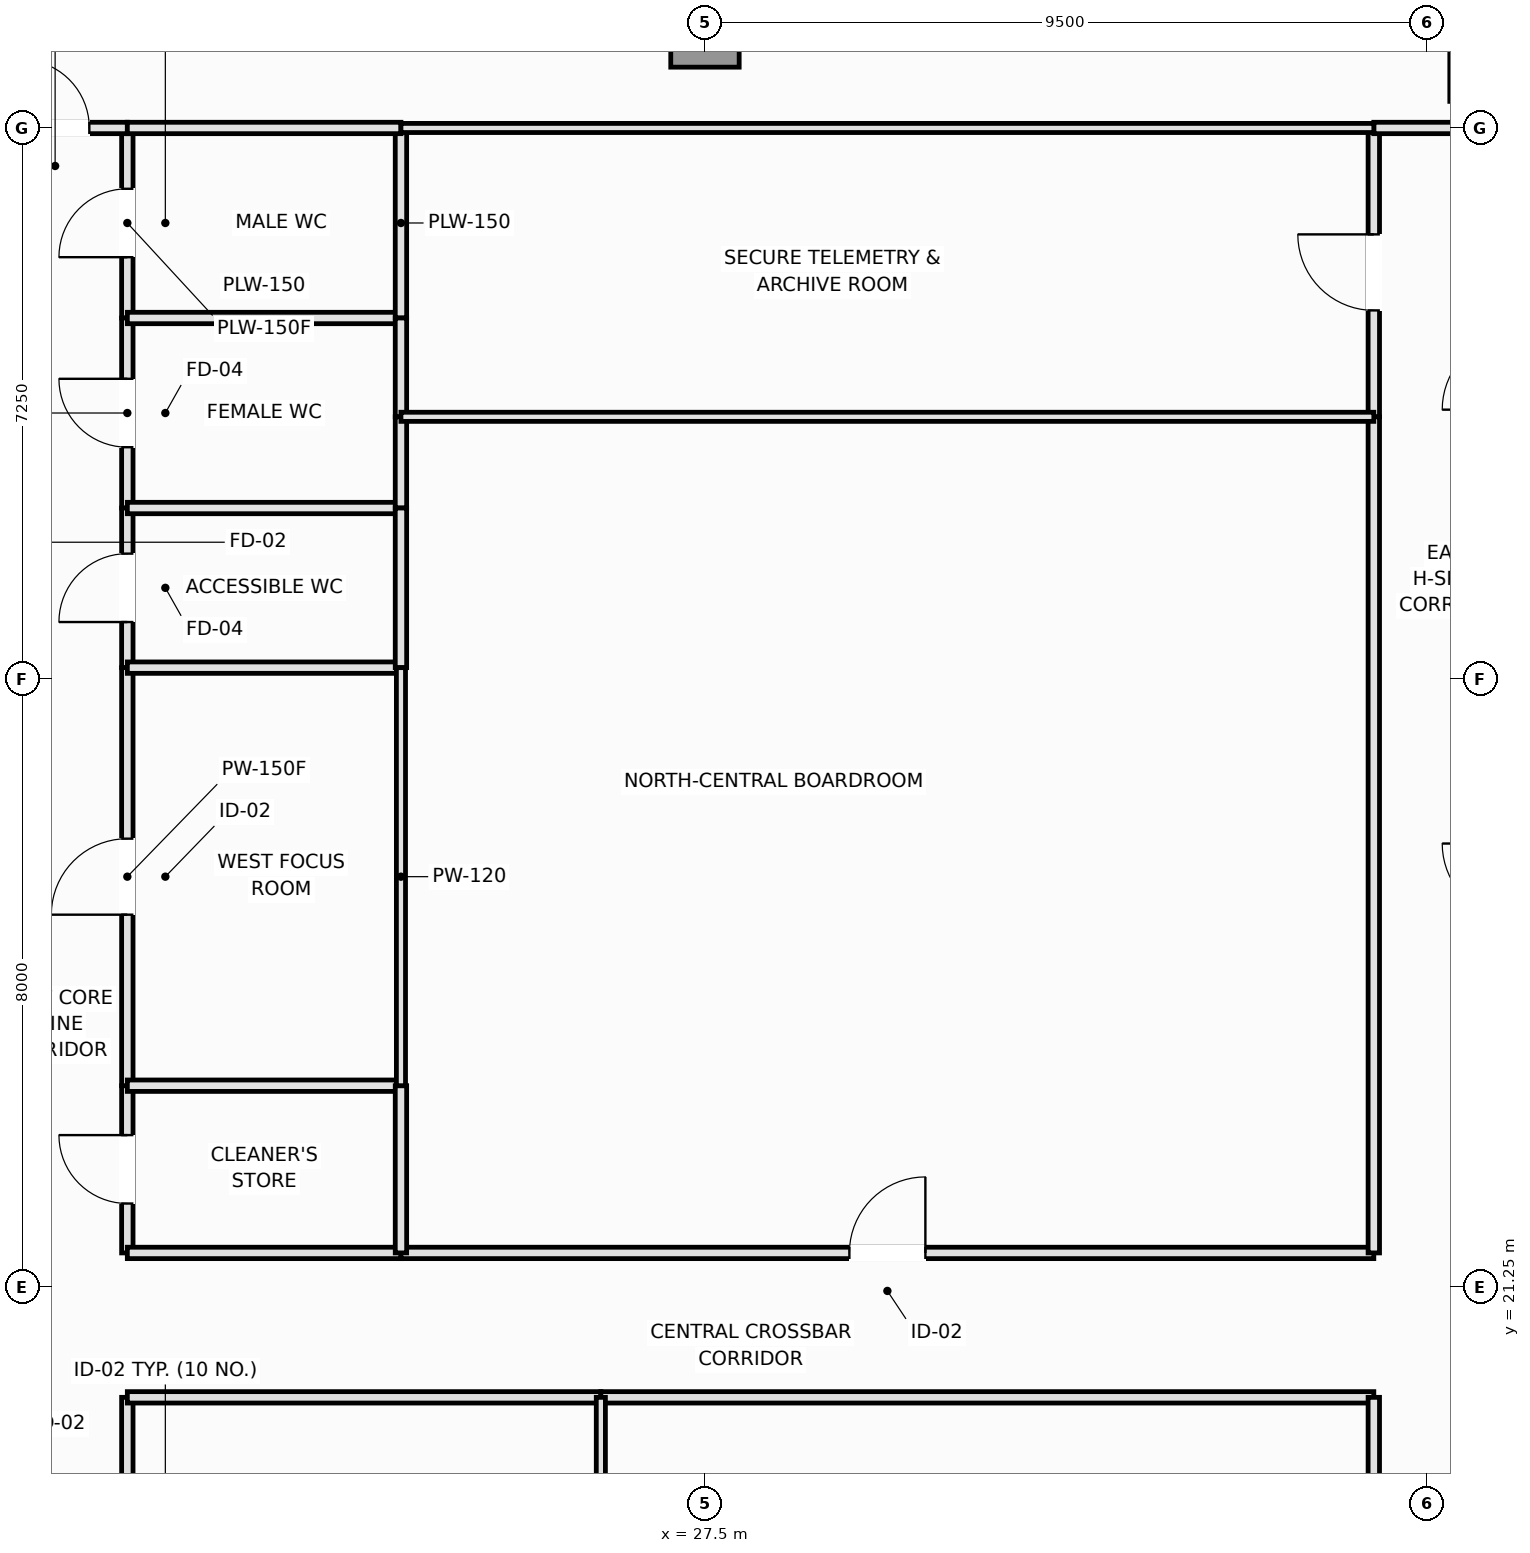
"""IFC4 building model, lengths in metres.
Left out: names, types, materials, properties, quantities, classifications, styles, units other than length and angle.
Written with IfcOpenShell. Run it as: python <this file> out.ifc"""

import sys

from ifc_helpers import new_model, si_unit, direction, frame, frame_2d, origin, origin_2d, place, context, subcontext, project, spatial, rectangle, extrude, element, fill, save


model = new_model("IFC4")
c1 = context("Model", 3, precision=1e-05, world=origin(), true_north=direction((0.0, 1.0)))
c2 = subcontext(c1, "Body", "Model", "MODEL_VIEW")
j1 = project(units=[si_unit("LENGTHUNIT", "METRE"), si_unit("PLANEANGLEUNIT", "RADIAN")], contexts=[c1])
p1 = place(None, origin())
s1 = spatial("IfcSite", under=j1, at=p1, CompositionType="ELEMENT")
p2 = place(p1, origin())
s2 = spatial("IfcBuilding", under=s1, at=p2, CompositionType="ELEMENT")
p3 = place(p2, frame((0.0, 0.0, 223.55)))
s3 = spatial("IfcBuildingStorey", under=s2, at=p3, CompositionType="ELEMENT", Elevation=223.55)
p4 = place(p3, frame((38.2, 37.75, 0.0), z_axis=(0.0, 0.0, 1.0), x_axis=(1.0, 0.0, 0.0)))
e1 = element("IfcColumn", 1, at=p4, inside=s3, PredefinedType="COLUMN", context=c2, shape_type="SweptSolid", body=[
    extrude(rectangle(XDim=1.8, YDim=1.8, at=origin_2d()), origin(), (0.0, 0.0, 1.0), 3.55),
])
p5 = place(p3, frame((27.5, 37.75, 0.0), z_axis=(0.0, 0.0, 1.0), x_axis=(1.0, 0.0, 0.0)))
e2 = element("IfcColumn", 2, at=p5, inside=s3, PredefinedType="COLUMN", context=c2, shape_type="SweptSolid", body=[
    extrude(rectangle(XDim=0.9, YDim=0.9, at=origin_2d()), origin(), (0.0, 0.0, 1.0), 3.55),
])
p6 = place(p3, frame((19.9, 15.9, 0.0), z_axis=(0.0, 0.0, 1.0), x_axis=(0.0, 1.0, 0.0)))
e3 = element("IfcWall", 3, at=p6, inside=s3, PredefinedType="PARTITIONING", context=c2, shape_type="SweptSolid", body=[
    extrude(rectangle(XDim=3.9, YDim=0.15, at=frame_2d((1.95, 0.0))), origin(), (0.0, 0.0, 1.0), 3.37),
])
p7 = place(p6, frame((1.45, 0.0, 0.0)))
e4 = element("IfcOpeningElement", 4, at=p7, cuts=e3, PredefinedType="OPENING", context=c2, shape_type="SweptSolid", body=[
    extrude(rectangle(XDim=1.0, YDim=2.15, at=frame_2d((0.5, 1.075))), frame((0.0, 0.085, 0.0), z_axis=(0.0, -1.0, 0.0), x_axis=(1.0, 0.0, 0.0)), (0.0, 0.0, 1.0), 0.17),
])
p8 = place(p3, frame((19.9, 34.0, 0.0), z_axis=(0.0, 0.0, 1.0), x_axis=(0.0, 1.0, 0.0)))
e5 = element("IfcWall", 5, at=p8, inside=s3, PredefinedType="PLUMBINGWALL", context=c2, shape_type="SweptSolid", body=[
    extrude(rectangle(XDim=2.5, YDim=0.15, at=frame_2d((1.25, 0.0))), origin(), (0.0, 0.0, 1.0), 3.37),
])
p9 = place(p8, frame((0.8, 0.0, 0.0)))
e6 = element("IfcOpeningElement", 6, at=p9, cuts=e5, PredefinedType="OPENING", context=c2, shape_type="SweptSolid", body=[
    extrude(rectangle(XDim=0.9, YDim=2.1, at=frame_2d((0.45, 1.05))), frame((0.0, 0.085, 0.0), z_axis=(0.0, -1.0, 0.0), x_axis=(1.0, 0.0, 0.0)), (0.0, 0.0, 1.0), 0.17),
])
p10 = place(p3, frame((19.9, 31.5, 0.0), z_axis=(0.0, 0.0, 1.0), x_axis=(0.0, 1.0, 0.0)))
e7 = element("IfcWall", 7, at=p10, inside=s3, PredefinedType="PLUMBINGWALL", context=c2, shape_type="SweptSolid", body=[
    extrude(rectangle(XDim=2.5, YDim=0.15, at=frame_2d((1.25, 0.0))), origin(), (0.0, 0.0, 1.0), 3.37),
])
p11 = place(p10, frame((0.8, 0.0, 0.0)))
e8 = element("IfcOpeningElement", 8, at=p11, cuts=e7, PredefinedType="OPENING", context=c2, shape_type="SweptSolid", body=[
    extrude(rectangle(XDim=0.9, YDim=2.1, at=frame_2d((0.45, 1.05))), frame((0.0, 0.085, 0.0), z_axis=(0.0, -1.0, 0.0), x_axis=(1.0, 0.0, 0.0)), (0.0, 0.0, 1.0), 0.17),
])
p12 = place(p3, frame((19.9, 29.4, 0.0), z_axis=(0.0, 0.0, 1.0), x_axis=(0.0, 1.0, 0.0)))
e9 = element("IfcWall", 9, at=p12, inside=s3, PredefinedType="PLUMBINGWALL", context=c2, shape_type="SweptSolid", body=[
    extrude(rectangle(XDim=2.1, YDim=0.15, at=frame_2d((1.05, 0.0))), origin(), (0.0, 0.0, 1.0), 3.37),
])
p13 = place(p12, frame((0.6, 0.0, 0.0)))
e10 = element("IfcOpeningElement", 10, at=p13, cuts=e9, PredefinedType="OPENING", context=c2, shape_type="SweptSolid", body=[
    extrude(rectangle(XDim=0.9, YDim=2.1, at=frame_2d((0.45, 1.05))), frame((0.0, 0.085, 0.0), z_axis=(0.0, -1.0, 0.0), x_axis=(1.0, 0.0, 0.0)), (0.0, 0.0, 1.0), 0.17),
])
p14 = place(p3, frame((19.9, 21.7, 0.0), z_axis=(0.0, 0.0, 1.0), x_axis=(0.0, 1.0, 0.0)))
e11 = element("IfcWall", 11, at=p14, inside=s3, PredefinedType="PLUMBINGWALL", context=c2, shape_type="SweptSolid", body=[
    extrude(rectangle(XDim=2.2, YDim=0.15, at=frame_2d((1.1, 0.0))), origin(), (0.0, 0.0, 1.0), 3.37),
])
p15 = place(p14, frame((0.65, 0.0, 0.0)))
e12 = element("IfcOpeningElement", 12, at=p15, cuts=e11, PredefinedType="OPENING", context=c2, shape_type="SweptSolid", body=[
    extrude(rectangle(XDim=0.9, YDim=2.1, at=frame_2d((0.45, 1.05))), frame((0.0, 0.085, 0.0), z_axis=(0.0, -1.0, 0.0), x_axis=(1.0, 0.0, 0.0)), (0.0, 0.0, 1.0), 0.17),
])
p16 = place(p3, frame((19.9, 23.9, 0.0), z_axis=(0.0, 0.0, 1.0), x_axis=(0.0, 1.0, 0.0)))
e13 = element("IfcWall", 13, at=p16, inside=s3, PredefinedType="PARTITIONING", context=c2, shape_type="SweptSolid", body=[
    extrude(rectangle(XDim=5.5, YDim=0.15, at=frame_2d((2.75, 0.0))), origin(), (0.0, 0.0, 1.0), 3.37),
])
p17 = place(p16, frame((2.25, 0.0, 0.0)))
e14 = element("IfcOpeningElement", 14, at=p17, cuts=e13, PredefinedType="OPENING", context=c2, shape_type="SweptSolid", body=[
    extrude(rectangle(XDim=1.0, YDim=2.15, at=frame_2d((0.5, 1.075))), frame((0.0, 0.085, 0.0), z_axis=(0.0, -1.0, 0.0), x_axis=(1.0, 0.0, 0.0)), (0.0, 0.0, 1.0), 0.17),
])
p18 = place(p3, frame((18.0, 36.5, 0.0), z_axis=(0.0, 0.0, 1.0), x_axis=(1.0, 0.0, 0.0)))
e15 = element("IfcWall", 15, at=p18, inside=s3, PredefinedType="PARTITIONING", context=c2, shape_type="SweptSolid", body=[
    extrude(rectangle(XDim=1.9, YDim=0.15, at=frame_2d((0.95, 0.0))), origin(), (0.0, 0.0, 1.0), 3.37),
])
p19 = place(p18, frame((0.5, 0.0, 0.0)))
e16 = element("IfcOpeningElement", 16, at=p19, cuts=e15, PredefinedType="OPENING", context=c2, shape_type="SweptSolid", body=[
    extrude(rectangle(XDim=0.9, YDim=2.1, at=frame_2d((0.45, 1.05))), frame((0.0, 0.085, 0.0), z_axis=(0.0, -1.0, 0.0), x_axis=(1.0, 0.0, 0.0)), (0.0, 0.0, 1.0), 0.17),
])
p20 = place(p3, frame((19.9, 19.8, 0.0), z_axis=(0.0, 0.0, 1.0), x_axis=(1.0, 0.0, 0.0)))
e17 = element("IfcWall", 17, at=p20, inside=s3, PredefinedType="PARTITIONING", context=c2, shape_type="SweptSolid", body=[
    extrude(rectangle(XDim=6.23, YDim=0.15, at=frame_2d((3.115, 0.0))), origin(), (0.0, 0.0, 1.0), 3.37),
])
p21 = place(p3, frame((26.13, 19.8, 0.0), z_axis=(0.0, 0.0, 1.0), x_axis=(1.0, 0.0, 0.0)))
e18 = element("IfcWall", 18, at=p21, inside=s3, PredefinedType="PARTITIONING", context=c2, shape_type="SweptSolid", body=[
    extrude(rectangle(XDim=10.17, YDim=0.15, at=frame_2d((5.085, 0.0))), origin(), (0.0, 0.0, 1.0), 3.37),
])
p22 = place(p3, frame((19.9, 21.7, 0.0), z_axis=(0.0, 0.0, 1.0), x_axis=(1.0, 0.0, 0.0)))
e19 = element("IfcWall", 19, at=p22, inside=s3, PredefinedType="PLUMBINGWALL", context=c2, shape_type="SweptSolid", body=[
    extrude(rectangle(XDim=3.6, YDim=0.15, at=frame_2d((1.8, 0.0))), origin(), (0.0, 0.0, 1.0), 3.37),
])
p23 = place(p3, frame((23.5, 21.7, 0.0), z_axis=(0.0, 0.0, 1.0), x_axis=(1.0, 0.0, 0.0)))
e20 = element("IfcWall", 20, at=p23, inside=s3, PredefinedType="PARTITIONING", context=c2, shape_type="SweptSolid", body=[
    extrude(rectangle(XDim=12.8, YDim=0.15, at=frame_2d((6.4, 0.0))), origin(), (0.0, 0.0, 1.0), 3.37),
])
p24 = place(p23, frame((5.9, 0.0, 0.0)))
e21 = element("IfcOpeningElement", 21, at=p24, cuts=e20, PredefinedType="OPENING", context=c2, shape_type="SweptSolid", body=[
    extrude(rectangle(XDim=1.0, YDim=2.15, at=frame_2d((0.5, 1.075))), frame((0.0, 0.085, 0.0), z_axis=(0.0, -1.0, 0.0), x_axis=(1.0, 0.0, 0.0)), (0.0, 0.0, 1.0), 0.17),
])
p25 = place(p3, frame((36.3, 15.9, 0.0), z_axis=(0.0, 0.0, 1.0), x_axis=(0.0, 1.0, 0.0)))
e22 = element("IfcWall", 22, at=p25, inside=s3, PredefinedType="PARTITIONING", context=c2, shape_type="SweptSolid", body=[
    extrude(rectangle(XDim=3.9, YDim=0.15, at=frame_2d((1.95, 0.0))), origin(), (0.0, 0.0, 1.0), 3.37),
])
p26 = place(p25, frame((1.45, 0.0, 0.0)))
e23 = element("IfcOpeningElement", 23, at=p26, cuts=e22, PredefinedType="OPENING", context=c2, shape_type="SweptSolid", body=[
    extrude(rectangle(XDim=1.0, YDim=2.15, at=frame_2d((0.5, 1.075))), frame((0.0, 0.085, 0.0), z_axis=(0.0, -1.0, 0.0), x_axis=(1.0, 0.0, 0.0)), (0.0, 0.0, 1.0), 0.17),
])
p27 = place(p3, frame((36.3, 32.7, 0.0), z_axis=(0.0, 0.0, 1.0), x_axis=(0.0, 1.0, 0.0)))
e24 = element("IfcWall", 24, at=p27, inside=s3, PredefinedType="PARTITIONING", context=c2, shape_type="SweptSolid", body=[
    extrude(rectangle(XDim=3.8, YDim=0.15, at=frame_2d((1.9, 0.0))), origin(), (0.0, 0.0, 1.0), 3.37),
])
p28 = place(p27, frame((1.4, 0.0, 0.0)))
e25 = element("IfcOpeningElement", 25, at=p28, cuts=e24, PredefinedType="OPENING", context=c2, shape_type="SweptSolid", body=[
    extrude(rectangle(XDim=1.0, YDim=2.15, at=frame_2d((0.5, 1.075))), frame((0.0, 0.085, 0.0), z_axis=(0.0, -1.0, 0.0), x_axis=(1.0, 0.0, 0.0)), (0.0, 0.0, 1.0), 0.17),
])
p29 = place(p3, frame((36.3, 21.7, 0.0), z_axis=(0.0, 0.0, 1.0), x_axis=(0.0, 1.0, 0.0)))
e26 = element("IfcWall", 26, at=p29, inside=s3, PredefinedType="PARTITIONING", context=c2, shape_type="SweptSolid", body=[
    extrude(rectangle(XDim=11.0, YDim=0.15, at=frame_2d((5.5, 0.0))), origin(), (0.0, 0.0, 1.0), 3.37),
])
p30 = place(p3, frame((36.3, 36.5, 0.0), z_axis=(0.0, 0.0, 1.0), x_axis=(1.0, 0.0, 0.0)))
e27 = element("IfcWall", 27, at=p30, inside=s3, PredefinedType="PARTITIONING", context=c2, shape_type="SweptSolid", body=[
    extrude(rectangle(XDim=1.9, YDim=0.15, at=frame_2d((0.95, 0.0))), origin(), (0.0, 0.0, 1.0), 3.37),
])
p31 = place(p3, frame((26.13, 15.9, 0.0), z_axis=(0.0, 0.0, 1.0), x_axis=(0.0, 1.0, 0.0)))
e28 = element("IfcWall", 28, at=p31, inside=s3, PredefinedType="PARTITIONING", context=c2, shape_type="SweptSolid", body=[
    extrude(rectangle(XDim=3.9, YDim=0.12, at=frame_2d((1.95, 0.0))), origin(), (0.0, 0.0, 1.0), 3.37),
])
p32 = place(p3, frame((19.9, 34.0, 0.0), z_axis=(0.0, 0.0, 1.0), x_axis=(1.0, 0.0, 0.0)))
e29 = element("IfcWall", 29, at=p32, inside=s3, PredefinedType="PLUMBINGWALL", context=c2, shape_type="SweptSolid", body=[
    extrude(rectangle(XDim=3.6, YDim=0.15, at=frame_2d((1.8, 0.0))), origin(), (0.0, 0.0, 1.0), 3.37),
])
p33 = place(p3, frame((23.5, 34.0, 0.0), z_axis=(0.0, 0.0, 1.0), x_axis=(0.0, 1.0, 0.0)))
e30 = element("IfcWall", 30, at=p33, inside=s3, PredefinedType="PLUMBINGWALL", context=c2, shape_type="SweptSolid", body=[
    extrude(rectangle(XDim=2.5, YDim=0.15, at=frame_2d((1.25, 0.0))), origin(), (0.0, 0.0, 1.0), 3.37),
])
for number, where, z_axis, x_axis in (
    (31, (19.9, 36.5, 0.0), (0.0, 0.0, 1.0), (1.0, 0.0, 0.0)),
    (32, (19.9, 31.5, 0.0), (0.0, 0.0, 1.0), (1.0, 0.0, 0.0)),
):
    element("IfcWall", number, at=place(p3, frame(where, z_axis=z_axis, x_axis=x_axis)), inside=s3, PredefinedType="PLUMBINGWALL", context=c2, shape_type="SweptSolid", body=[
        extrude(rectangle(XDim=3.6, YDim=0.15, at=frame_2d((1.8, 0.0))), origin(), (0.0, 0.0, 1.0), 3.37),
    ])
p34 = place(p3, frame((23.5, 32.7, 0.0), z_axis=(0.0, 0.0, 1.0), x_axis=(0.0, 1.0, 0.0)))
e33 = element("IfcWall", 33, at=p34, inside=s3, PredefinedType="PLUMBINGWALL", context=c2, shape_type="SweptSolid", body=[
    extrude(rectangle(XDim=1.3, YDim=0.15, at=frame_2d((0.65, 0.0))), origin(), (0.0, 0.0, 1.0), 3.37),
])
p35 = place(p3, frame((23.5, 31.5, 0.0), z_axis=(0.0, 0.0, 1.0), x_axis=(0.0, 1.0, 0.0)))
e34 = element("IfcWall", 34, at=p35, inside=s3, PredefinedType="PLUMBINGWALL", context=c2, shape_type="SweptSolid", body=[
    extrude(rectangle(XDim=1.2, YDim=0.15, at=frame_2d((0.6, 0.0))), origin(), (0.0, 0.0, 1.0), 3.37),
])
p36 = place(p3, frame((19.9, 29.4, 0.0), z_axis=(0.0, 0.0, 1.0), x_axis=(1.0, 0.0, 0.0)))
e35 = element("IfcWall", 35, at=p36, inside=s3, PredefinedType="PLUMBINGWALL", context=c2, shape_type="SweptSolid", body=[
    extrude(rectangle(XDim=3.6, YDim=0.15, at=frame_2d((1.8, 0.0))), origin(), (0.0, 0.0, 1.0), 3.37),
])
p37 = place(p3, frame((23.5, 29.4, 0.0), z_axis=(0.0, 0.0, 1.0), x_axis=(0.0, 1.0, 0.0)))
e36 = element("IfcWall", 36, at=p37, inside=s3, PredefinedType="PLUMBINGWALL", context=c2, shape_type="SweptSolid", body=[
    extrude(rectangle(XDim=2.1, YDim=0.15, at=frame_2d((1.05, 0.0))), origin(), (0.0, 0.0, 1.0), 3.37),
])
p38 = place(p3, frame((19.9, 23.9, 0.0), z_axis=(0.0, 0.0, 1.0), x_axis=(1.0, 0.0, 0.0)))
e37 = element("IfcWall", 37, at=p38, inside=s3, PredefinedType="PLUMBINGWALL", context=c2, shape_type="SweptSolid", body=[
    extrude(rectangle(XDim=3.6, YDim=0.15, at=frame_2d((1.8, 0.0))), origin(), (0.0, 0.0, 1.0), 3.37),
])
p39 = place(p3, frame((23.5, 21.7, 0.0), z_axis=(0.0, 0.0, 1.0), x_axis=(0.0, 1.0, 0.0)))
e38 = element("IfcWall", 38, at=p39, inside=s3, PredefinedType="PLUMBINGWALL", context=c2, shape_type="SweptSolid", body=[
    extrude(rectangle(XDim=2.2, YDim=0.15, at=frame_2d((1.1, 0.0))), origin(), (0.0, 0.0, 1.0), 3.37),
])
p40 = place(p3, frame((23.5, 23.9, 0.0), z_axis=(0.0, 0.0, 1.0), x_axis=(0.0, 1.0, 0.0)))
e39 = element("IfcWall", 39, at=p40, inside=s3, PredefinedType="PARTITIONING", context=c2, shape_type="SweptSolid", body=[
    extrude(rectangle(XDim=5.5, YDim=0.12, at=frame_2d((2.75, 0.0))), origin(), (0.0, 0.0, 1.0), 3.37),
])
for number, where, z_axis, x_axis in (
    (40, (23.5, 32.7, 0.0), (0.0, 0.0, 1.0), (1.0, 0.0, 0.0)),
    (41, (23.5, 36.5, 0.0), (0.0, 0.0, 1.0), (1.0, 0.0, 0.0)),
):
    element("IfcWall", number, at=place(p3, frame(where, z_axis=z_axis, x_axis=x_axis)), inside=s3, PredefinedType="PARTITIONING", context=c2, shape_type="SweptSolid", body=[
        extrude(rectangle(XDim=12.8, YDim=0.12, at=frame_2d((6.4, 0.0))), origin(), (0.0, 0.0, 1.0), 3.37),
    ])
p41 = place(p9, origin())
e42 = element("IfcDoor", 42, at=p41, inside=s3, OperationType="SINGLE_SWING_LEFT", PredefinedType="DOOR", context=c2, shape_type="SweptSolid", body=[
    extrude(rectangle(XDim=0.9, YDim=2.1, at=frame_2d((0.45, 1.05))), frame((0.0, 0.025, 0.0), z_axis=(0.0, -1.0, 0.0), x_axis=(1.0, 0.0, 0.0)), (0.0, 0.0, 1.0), 0.05),
])
fill(e6, e42)
p42 = place(p11, origin())
e43 = element("IfcDoor", 43, at=p42, inside=s3, OperationType="SINGLE_SWING_RIGHT", PredefinedType="DOOR", context=c2, shape_type="SweptSolid", body=[
    extrude(rectangle(XDim=0.9, YDim=2.1, at=frame_2d((0.45, 1.05))), frame((0.0, 0.025, 0.0), z_axis=(0.0, -1.0, 0.0), x_axis=(1.0, 0.0, 0.0)), (0.0, 0.0, 1.0), 0.05),
])
fill(e8, e43)
p43 = place(p13, origin())
e44 = element("IfcDoor", 44, at=p43, inside=s3, OperationType="SINGLE_SWING_LEFT", PredefinedType="DOOR", context=c2, shape_type="SweptSolid", body=[
    extrude(rectangle(XDim=0.9, YDim=2.1, at=frame_2d((0.45, 1.05))), frame((0.0, 0.025, 0.0), z_axis=(0.0, -1.0, 0.0), x_axis=(1.0, 0.0, 0.0)), (0.0, 0.0, 1.0), 0.05),
])
fill(e10, e44)
p44 = place(p15, origin())
e45 = element("IfcDoor", 45, at=p44, inside=s3, OperationType="SINGLE_SWING_RIGHT", PredefinedType="DOOR", context=c2, shape_type="SweptSolid", body=[
    extrude(rectangle(XDim=0.9, YDim=2.1, at=frame_2d((0.45, 1.05))), frame((0.0, 0.025, 0.0), z_axis=(0.0, -1.0, 0.0), x_axis=(1.0, 0.0, 0.0)), (0.0, 0.0, 1.0), 0.05),
])
fill(e12, e45)
p45 = place(p17, origin())
e46 = element("IfcDoor", 46, at=p45, inside=s3, OperationType="SINGLE_SWING_LEFT", PredefinedType="DOOR", context=c2, shape_type="SweptSolid", body=[
    extrude(rectangle(XDim=1.0, YDim=2.15, at=frame_2d((0.5, 1.075))), frame((0.0, 0.025, 0.0), z_axis=(0.0, -1.0, 0.0), x_axis=(1.0, 0.0, 0.0)), (0.0, 0.0, 1.0), 0.05),
])
fill(e14, e46)
p46 = place(p19, origin())
e47 = element("IfcDoor", 47, at=p46, inside=s3, OperationType="SINGLE_SWING_LEFT", PredefinedType="DOOR", context=c2, shape_type="SweptSolid", body=[
    extrude(rectangle(XDim=0.9, YDim=2.1, at=frame_2d((0.45, 1.05))), frame((0.0, 0.025, 0.0), z_axis=(0.0, -1.0, 0.0), x_axis=(1.0, 0.0, 0.0)), (0.0, 0.0, 1.0), 0.05),
])
fill(e16, e47)
p47 = place(p24, origin())
e48 = element("IfcDoor", 48, at=p47, inside=s3, OperationType="SINGLE_SWING_RIGHT", PredefinedType="DOOR", context=c2, shape_type="SweptSolid", body=[
    extrude(rectangle(XDim=1.0, YDim=2.15, at=frame_2d((0.5, 1.075))), frame((0.0, 0.025, 0.0), z_axis=(0.0, -1.0, 0.0), x_axis=(1.0, 0.0, 0.0)), (0.0, 0.0, 1.0), 0.05),
])
fill(e21, e48)
p48 = place(p28, origin())
e49 = element("IfcDoor", 49, at=p48, inside=s3, OperationType="SINGLE_SWING_RIGHT", PredefinedType="DOOR", context=c2, shape_type="SweptSolid", body=[
    extrude(rectangle(XDim=1.0, YDim=2.15, at=frame_2d((0.5, 1.075))), frame((0.0, 0.025, 0.0), z_axis=(0.0, -1.0, 0.0), x_axis=(1.0, 0.0, 0.0)), (0.0, 0.0, 1.0), 0.05),
])
fill(e25, e49)
save(model, sys.argv[1])
